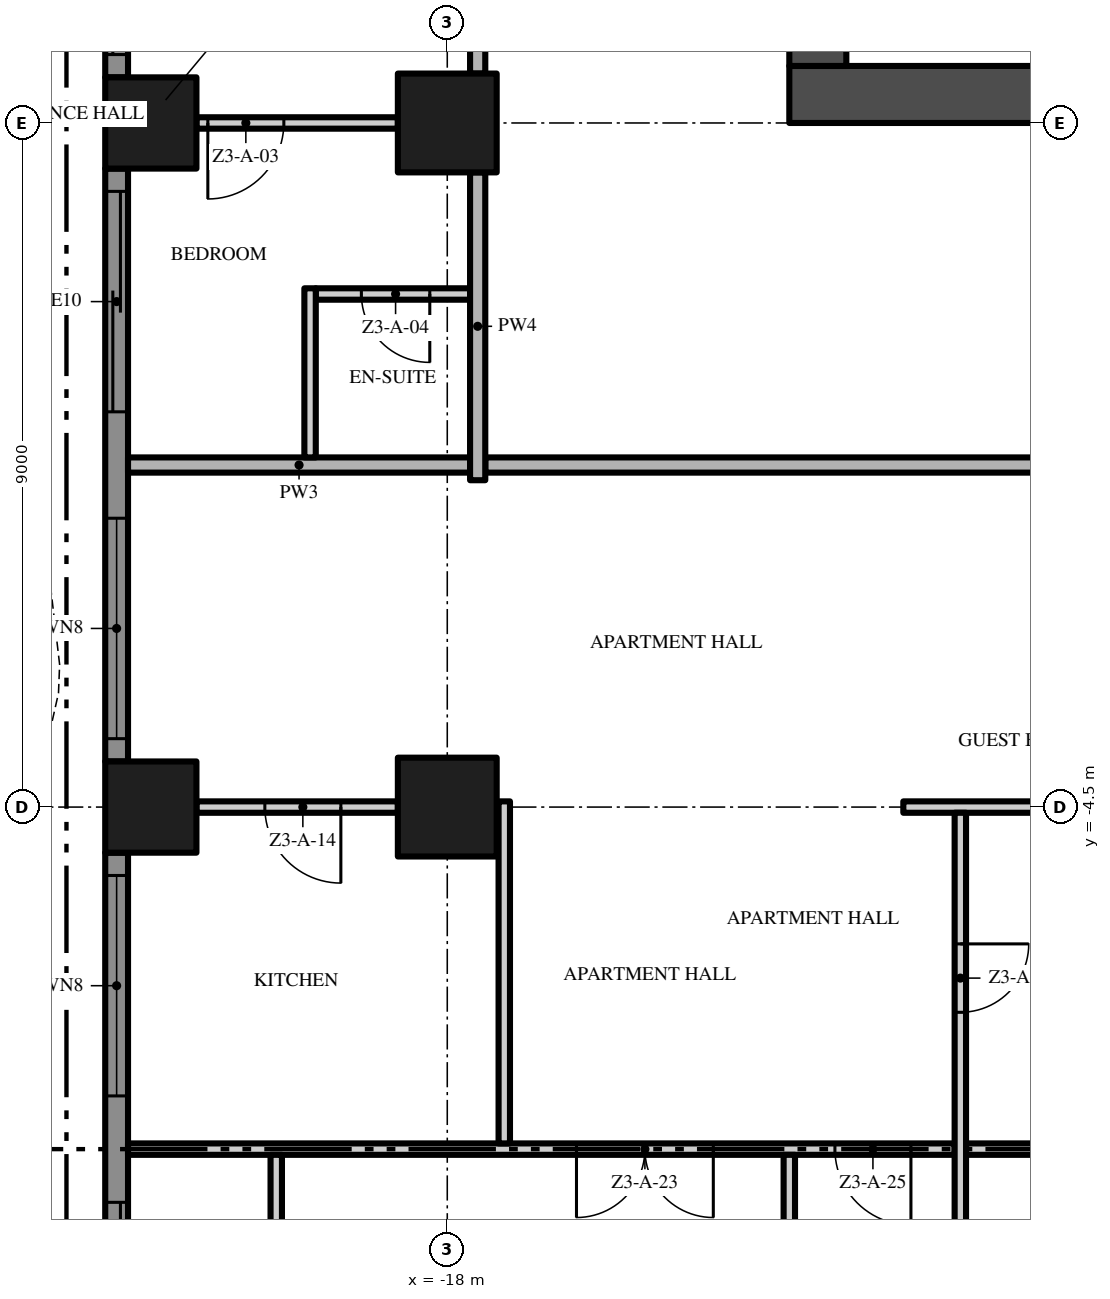
"""IFC4 building model, lengths in metres.
Left out: names, types, materials, properties, quantities, classifications, styles, units other than length and angle.
Written with IfcOpenShell. Run it as: python <this file> out.ifc"""

import sys

from ifc_helpers import new_model, si_unit, direction, frame, frame_2d, origin, origin_2d, place, context, subcontext, project, spatial, polyline, rectangle, outline, extrude, element, fill, save


model = new_model("IFC4")
c1 = context("Model", 3, precision=1e-05, world=origin(), true_north=direction((0.0, 1.0)))
c2 = subcontext(c1, "Body", "Model", "MODEL_VIEW")
j1 = project(units=[si_unit("LENGTHUNIT", "METRE"), si_unit("PLANEANGLEUNIT", "RADIAN")], contexts=[c1])
p1 = place(None, origin())
s1 = spatial("IfcSite", under=j1, at=p1, CompositionType="ELEMENT")
p2 = place(p1, origin())
s2 = spatial("IfcBuilding", under=s1, at=p2, CompositionType="ELEMENT")
p3 = place(p2, frame((0.0, 0.0, 125.0)))
s3 = spatial("IfcBuildingStorey", under=s2, at=p3, CompositionType="ELEMENT", Elevation=125.0)
p4 = place(p3, frame((-13.5, 4.875, -0.3), z_axis=(0.0, 0.0, 1.0), x_axis=(1.0, 0.0, 0.0)))
e1 = element("IfcWall", 1, at=p4, inside=s3, PredefinedType="SHEAR", context=c2, shape_type="SweptSolid", body=[
    extrude(rectangle(XDim=27.0, YDim=0.75, at=frame_2d((13.5, 0.0))), origin(), (0.0, 0.0, 1.0), 3.8),
])
p5 = place(p4, frame((12.0, 0.0, 0.3)))
e2 = element("IfcOpeningElement", 2, at=p5, cuts=e1, PredefinedType="OPENING", context=c2, shape_type="SweptSolid", body=[
    extrude(rectangle(XDim=3.0, YDim=2.4, at=frame_2d((1.5, 1.2))), frame((0.0, 0.385, 0.0), z_axis=(0.0, -1.0, 0.0), x_axis=(1.0, 0.0, 0.0)), (0.0, 0.0, 1.0), 0.77),
])
p6 = place(p4, frame((4.9, 0.0, 0.3)))
e3 = element("IfcOpeningElement", 3, at=p6, cuts=e1, PredefinedType="OPENING", context=c2, shape_type="SweptSolid", body=[
    extrude(rectangle(XDim=1.2, YDim=2.2, at=frame_2d((0.6, 1.1))), frame((0.0, 0.385, 0.0), z_axis=(0.0, -1.0, 0.0), x_axis=(1.0, 0.0, 0.0)), (0.0, 0.0, 1.0), 0.77),
])
p7 = place(p4, frame((20.75, 0.0, 0.3)))
e4 = element("IfcOpeningElement", 4, at=p7, cuts=e1, PredefinedType="OPENING", context=c2, shape_type="SweptSolid", body=[
    extrude(rectangle(XDim=1.5, YDim=2.2, at=frame_2d((0.75, 1.1))), frame((0.0, 0.385, 0.0), z_axis=(0.0, -1.0, 0.0), x_axis=(1.0, 0.0, 0.0)), (0.0, 0.0, 1.0), 0.77),
])
p8 = place(p4, frame((17.4, 0.0, 0.3)))
e5 = element("IfcOpeningElement", 5, at=p8, cuts=e1, PredefinedType="OPENING", context=c2, shape_type="SweptSolid", body=[
    extrude(rectangle(XDim=1.2, YDim=2.2, at=frame_2d((0.6, 1.1))), frame((0.0, 0.385, 0.0), z_axis=(0.0, -1.0, 0.0), x_axis=(1.0, 0.0, 0.0)), (0.0, 0.0, 1.0), 0.77),
])
p9 = place(p3, frame((-13.125, 21.75, -0.3), z_axis=(0.0, 0.0, 1.0), x_axis=(0.0, -1.0, 0.0)))
e6 = element("IfcWall", 6, at=p9, inside=s3, PredefinedType="SHEAR", context=c2, shape_type="SweptSolid", body=[
    extrude(rectangle(XDim=16.5, YDim=0.75, at=frame_2d((8.25, 0.0))), origin(), (0.0, 0.0, 1.0), 3.8),
])
p10 = place(p9, frame((9.15, 0.0, 0.3)))
e7 = element("IfcOpeningElement", 7, at=p10, cuts=e6, PredefinedType="OPENING", context=c2, shape_type="SweptSolid", body=[
    extrude(rectangle(XDim=1.2, YDim=2.2, at=frame_2d((0.6, 1.1))), frame((0.0, 0.385, 0.0), z_axis=(0.0, -1.0, 0.0), x_axis=(1.0, 0.0, 0.0)), (0.0, 0.0, 1.0), 0.77),
])
for number, where, z_axis, x_axis in (
    (8, (-18.0, -4.5, 0.0), (0.0, 0.0, 1.0), (1.0, 0.0, 0.0)),
    (9, (-18.0, 4.5, 0.0), (0.0, 0.0, 1.0), (1.0, 0.0, 0.0)),
):
    element("IfcColumn", number, at=place(p3, frame(where, z_axis=z_axis, x_axis=x_axis)), inside=s3, PredefinedType="COLUMN", context=c2, shape_type="SweptSolid", body=[
        extrude(rectangle(XDim=1.3, YDim=1.3, at=origin_2d()), origin(), (0.0, 0.0, 1.0), 3.5),
    ])
for number, where, z_axis, x_axis in (
    (10, (-21.9, -4.5, 0.0), (0.0, 0.0, 1.0), (1.0, 0.0, 0.0)),
    (11, (-21.9, 4.5, 0.0), (0.0, 0.0, 1.0), (1.0, 0.0, 0.0)),
):
    element("IfcColumn", number, at=place(p3, frame(where, z_axis=z_axis, x_axis=x_axis)), inside=s3, PredefinedType="COLUMN", context=c2, shape_type="SweptSolid", body=[
        extrude(rectangle(XDim=1.2, YDim=1.2, at=origin_2d()), origin(), (0.0, 0.0, 1.0), 3.5),
    ])
p11 = place(p3, frame((-22.35, 5.1, 0.0), z_axis=(0.0, 0.0, 1.0), x_axis=(0.0, 1.0, 0.0)))
e12 = element("IfcWall", 12, at=p11, inside=s3, PredefinedType="SOLIDWALL", context=c2, shape_type="SweptSolid", body=[
    extrude(rectangle(XDim=7.8, YDim=0.3, at=frame_2d((3.9, 0.0))), origin(), (0.0, 0.0, 1.0), 3.5),
])
p12 = place(p11, frame((4.6, 0.0, 0.45)))
e13 = element("IfcOpeningElement", 13, at=p12, cuts=e12, PredefinedType="OPENING", context=c2, shape_type="SweptSolid", body=[
    extrude(rectangle(XDim=2.9, YDim=2.65, at=frame_2d((1.45, 1.325))), frame((0.0, 0.16, 0.0), z_axis=(0.0, -1.0, 0.0), x_axis=(1.0, 0.0, 0.0)), (0.0, 0.0, 1.0), 0.32),
])
p13 = place(p11, frame((0.3, 0.0, 0.0)))
e14 = element("IfcOpeningElement", 14, at=p13, cuts=e12, PredefinedType="OPENING", context=c2, shape_type="SweptSolid", body=[
    extrude(rectangle(XDim=2.9, YDim=2.4, at=frame_2d((1.45, 1.2))), frame((0.0, 0.16, 0.0), z_axis=(0.0, -1.0, 0.0), x_axis=(1.0, 0.0, 0.0)), (0.0, 0.0, 1.0), 0.32),
])
p14 = place(p3, frame((-22.35, -3.9, 0.0), z_axis=(0.0, 0.0, 1.0), x_axis=(0.0, 1.0, 0.0)))
e15 = element("IfcWall", 15, at=p14, inside=s3, PredefinedType="SOLIDWALL", context=c2, shape_type="SweptSolid", body=[
    extrude(rectangle(XDim=7.8, YDim=0.3, at=frame_2d((3.9, 0.0))), origin(), (0.0, 0.0, 1.0), 3.5),
])
p15 = place(p14, frame((4.6, 0.0, 0.0)))
e16 = element("IfcOpeningElement", 16, at=p15, cuts=e15, PredefinedType="OPENING", context=c2, shape_type="SweptSolid", body=[
    extrude(rectangle(XDim=2.9, YDim=2.4, at=frame_2d((1.45, 1.2))), frame((0.0, 0.16, 0.0), z_axis=(0.0, -1.0, 0.0), x_axis=(1.0, 0.0, 0.0)), (0.0, 0.0, 1.0), 0.32),
])
p16 = place(p14, frame((0.3, 0.0, 0.45)))
e17 = element("IfcOpeningElement", 17, at=p16, cuts=e15, PredefinedType="OPENING", context=c2, shape_type="SweptSolid", body=[
    extrude(rectangle(XDim=2.9, YDim=2.65, at=frame_2d((1.45, 1.325))), frame((0.0, 0.16, 0.0), z_axis=(0.0, -1.0, 0.0), x_axis=(1.0, 0.0, 0.0)), (0.0, 0.0, 1.0), 0.32),
])
p17 = place(p3, frame((-22.35, -12.3, 0.0), z_axis=(0.0, 0.0, 1.0), x_axis=(0.0, 1.0, 0.0)))
e18 = element("IfcWall", 18, at=p17, inside=s3, PredefinedType="SOLIDWALL", context=c2, shape_type="SweptSolid", body=[
    extrude(rectangle(XDim=7.2, YDim=0.3, at=frame_2d((3.6, 0.0))), origin(), (0.0, 0.0, 1.0), 3.5),
])
p18 = place(p17, frame((4.0, 0.0, 0.45)))
e19 = element("IfcOpeningElement", 19, at=p18, cuts=e18, PredefinedType="OPENING", context=c2, shape_type="SweptSolid", body=[
    extrude(rectangle(XDim=2.9, YDim=2.65, at=frame_2d((1.45, 1.325))), frame((0.0, 0.16, 0.0), z_axis=(0.0, -1.0, 0.0), x_axis=(1.0, 0.0, 0.0)), (0.0, 0.0, 1.0), 0.32),
])
p19 = place(p17, frame((0.3, 0.0, 0.0)))
e20 = element("IfcOpeningElement", 20, at=p19, cuts=e18, PredefinedType="OPENING", context=c2, shape_type="SweptSolid", body=[
    extrude(rectangle(XDim=2.3, YDim=2.4, at=frame_2d((1.15, 1.2))), frame((0.0, 0.16, 0.0), z_axis=(0.0, -1.0, 0.0), x_axis=(1.0, 0.0, 0.0)), (0.0, 0.0, 1.0), 0.32),
])
p20 = place(p3, origin())
e21 = element("IfcWall", 21, at=p20, inside=s3, PredefinedType="USERDEFINED", context=c2, shape_type="SweptSolid", body=[
    extrude(outline(polyline([(-25.149, 18.0), (-24.488, 16.5), (-23.755, 15.0), (-23.231, 13.5), (-23.1, 12.375), (-23.115, 12.0), (-23.451, 10.5), (-24.112, 9.0), (-24.845, 7.5), (-25.369, 6.0), (-25.5, 4.875), (-25.485, 4.5), (-25.149, 3.0), (-24.488, 1.5), (-23.755, 0.0), (-23.231, -1.5), (-23.1, -2.625), (-23.115, -3.0), (-23.451, -4.5), (-24.112, -6.0), (-24.845, -7.5), (-25.369, -9.0), (-25.5, -10.125), (-25.485, -10.5), (-25.149, -12.0), (-24.488, -13.5), (-24.259, -13.399), (-24.91, -11.921), (-25.236, -10.467), (-25.249, -10.135), (-25.124, -9.056), (-24.614, -7.596), (-23.885, -6.105), (-23.213, -4.579), (-22.866, -3.033), (-22.849, -2.615), (-22.986, -1.444), (-23.524, 0.096), (-24.261, 1.605), (-24.91, 3.079), (-25.236, 4.533), (-25.249, 4.865), (-25.124, 5.944), (-24.614, 7.404), (-23.885, 8.895), (-23.213, 10.421), (-22.866, 11.967), (-22.849, 12.385), (-22.986, 13.556), (-23.524, 15.096), (-24.261, 16.605), (-24.92, 18.101), (-25.149, 18.0)])), origin(), (0.0, 0.0, 1.0), 0.9),
])
p21 = place(p3, frame((-11.325, -9.0, 0.0), z_axis=(0.0, 0.0, 1.0), x_axis=(-1.0, 0.0, 0.0)))
e22 = element("IfcWall", 22, at=p21, inside=s3, PredefinedType="PARTITIONING", context=c2, shape_type="SweptSolid", body=[
    extrude(rectangle(XDim=10.875, YDim=0.15, at=frame_2d((5.438, 0.0))), origin(), (0.0, 0.0, 1.0), 3.5),
])
p22 = place(p21, frame((3.175, 0.0, 0.0)))
e23 = element("IfcOpeningElement", 23, at=p22, cuts=e22, PredefinedType="OPENING", context=c2, shape_type="SweptSolid", body=[
    extrude(rectangle(XDim=1.8, YDim=2.4, at=frame_2d((0.9, 1.2))), frame((0.0, 0.085, 0.0), z_axis=(0.0, -1.0, 0.0), x_axis=(1.0, 0.0, 0.0)), (0.0, 0.0, 1.0), 0.17),
])
p23 = place(p21, frame((0.575, 0.0, 0.0)))
e24 = element("IfcOpeningElement", 24, at=p23, cuts=e22, PredefinedType="OPENING", context=c2, shape_type="SweptSolid", body=[
    extrude(rectangle(XDim=1.0, YDim=2.4, at=frame_2d((0.5, 1.2))), frame((0.0, 0.085, 0.0), z_axis=(0.0, -1.0, 0.0), x_axis=(1.0, 0.0, 0.0)), (0.0, 0.0, 1.0), 0.17),
])
p24 = place(p3, frame((-11.175, -9.0, 0.0), z_axis=(0.0, 0.0, 1.0), x_axis=(1.0, 0.0, 0.0)))
e25 = element("IfcWall", 25, at=p24, inside=s3, PredefinedType="PARTITIONING", context=c2, shape_type="SweptSolid", body=[
    extrude(rectangle(XDim=2.1, YDim=0.15, at=frame_2d((1.05, 0.0))), origin(), (0.0, 0.0, 1.0), 3.5),
])
p25 = place(p3, frame((-18.65, -4.5, 0.0), z_axis=(0.0, 0.0, 1.0), x_axis=(-1.0, 0.0, 0.0)))
e26 = element("IfcWall", 26, at=p25, inside=s3, PredefinedType="PARTITIONING", context=c2, shape_type="SweptSolid", body=[
    extrude(rectangle(XDim=2.65, YDim=0.15, at=frame_2d((1.325, 0.0))), origin(), (0.0, 0.0, 1.0), 3.5),
])
p26 = place(p25, frame((0.75, 0.0, 0.0)))
e27 = element("IfcOpeningElement", 27, at=p26, cuts=e26, PredefinedType="OPENING", context=c2, shape_type="SweptSolid", body=[
    extrude(rectangle(XDim=1.0, YDim=2.4, at=frame_2d((0.5, 1.2))), frame((0.0, 0.085, 0.0), z_axis=(0.0, -1.0, 0.0), x_axis=(1.0, 0.0, 0.0)), (0.0, 0.0, 1.0), 0.17),
])
p27 = place(p3, frame((-12.0, -4.5, 0.0), z_axis=(0.0, 0.0, 1.0), x_axis=(1.0, 0.0, 0.0)))
e28 = element("IfcWall", 28, at=p27, inside=s3, PredefinedType="PARTITIONING", context=c2, shape_type="SweptSolid", body=[
    extrude(rectangle(XDim=2.35, YDim=0.15, at=frame_2d((1.175, 0.0))), origin(), (0.0, 0.0, 1.0), 3.5),
])
p28 = place(p3, frame((17.5, 0.0, 0.0), z_axis=(0.0, 0.0, 1.0), x_axis=(-1.0, 0.0, 0.0)))
e29 = element("IfcWall", 29, at=p28, inside=s3, PredefinedType="PARTITIONING", context=c2, shape_type="SweptSolid", body=[
    extrude(rectangle(XDim=35.0, YDim=0.2, at=frame_2d((17.5, 0.0))), origin(), (0.0, 0.0, 1.0), 3.5),
])
p29 = place(p28, frame((16.75, 0.0, 0.0)))
e30 = element("IfcOpeningElement", 30, at=p29, cuts=e29, PredefinedType="OPENING", context=c2, shape_type="SweptSolid", body=[
    extrude(rectangle(XDim=1.5, YDim=2.4, at=frame_2d((0.75, 1.2))), frame((0.0, 0.11, 0.0), z_axis=(0.0, -1.0, 0.0), x_axis=(1.0, 0.0, 0.0)), (0.0, 0.0, 1.0), 0.22),
])
p30 = place(p3, frame((-22.2, 0.0, 0.0), z_axis=(0.0, 0.0, 1.0), x_axis=(1.0, 0.0, 0.0)))
e31 = element("IfcWall", 31, at=p30, inside=s3, PredefinedType="PARTITIONING", context=c2, shape_type="SweptSolid", body=[
    extrude(rectangle(XDim=4.5, YDim=0.2, at=frame_2d((2.25, 0.0))), origin(), (0.0, 0.0, 1.0), 3.5),
])
p31 = place(p3, frame((-17.7, 2.25, 0.0), z_axis=(0.0, 0.0, 1.0), x_axis=(-1.0, 0.0, 0.0)))
e32 = element("IfcWall", 32, at=p31, inside=s3, PredefinedType="PARTITIONING", context=c2, shape_type="SweptSolid", body=[
    extrude(rectangle(XDim=2.03, YDim=0.15, at=frame_2d((1.015, 0.0))), origin(), (0.0, 0.0, 1.0), 3.5),
])
p32 = place(p31, frame((0.53, 0.0, 0.0)))
e33 = element("IfcOpeningElement", 33, at=p32, cuts=e32, PredefinedType="OPENING", context=c2, shape_type="SweptSolid", body=[
    extrude(rectangle(XDim=0.9, YDim=2.1, at=frame_2d((0.45, 1.05))), frame((0.0, 0.085, 0.0), z_axis=(0.0, -1.0, 0.0), x_axis=(1.0, 0.0, 0.0)), (0.0, 0.0, 1.0), 0.17),
])
p33 = place(p3, frame((-18.65, 4.5, 0.0), z_axis=(0.0, 0.0, 1.0), x_axis=(-1.0, 0.0, 0.0)))
e34 = element("IfcWall", 34, at=p33, inside=s3, PredefinedType="PARTITIONING", context=c2, shape_type="SweptSolid", body=[
    extrude(rectangle(XDim=2.65, YDim=0.15, at=frame_2d((1.325, 0.0))), origin(), (0.0, 0.0, 1.0), 3.5),
])
p34 = place(p33, frame((1.5, 0.0, 0.0)))
e35 = element("IfcOpeningElement", 35, at=p34, cuts=e34, PredefinedType="OPENING", context=c2, shape_type="SweptSolid", body=[
    extrude(rectangle(XDim=1.0, YDim=2.4, at=frame_2d((0.5, 1.2))), frame((0.0, 0.085, 0.0), z_axis=(0.0, -1.0, 0.0), x_axis=(1.0, 0.0, 0.0)), (0.0, 0.0, 1.0), 0.17),
])
p35 = place(p3, frame((-20.25, -12.075, 0.0), z_axis=(0.0, 0.0, 1.0), x_axis=(0.0, 1.0, 0.0)))
e36 = element("IfcWall", 36, at=p35, inside=s3, PredefinedType="PARTITIONING", context=c2, shape_type="SweptSolid", body=[
    extrude(rectangle(XDim=3.0, YDim=0.15, at=frame_2d((1.5, 0.0))), origin(), (0.0, 0.0, 1.0), 3.5),
])
p36 = place(p35, frame((1.125, 0.0, 0.0)))
e37 = element("IfcOpeningElement", 37, at=p36, cuts=e36, PredefinedType="OPENING", context=c2, shape_type="SweptSolid", body=[
    extrude(rectangle(XDim=0.9, YDim=2.1, at=frame_2d((0.45, 1.05))), frame((0.0, 0.085, 0.0), z_axis=(0.0, -1.0, 0.0), x_axis=(1.0, 0.0, 0.0)), (0.0, 0.0, 1.0), 0.17),
])
p37 = place(p3, frame((-19.805, 0.1, 0.0), z_axis=(0.0, 0.0, 1.0), x_axis=(0.0, 1.0, 0.0)))
e38 = element("IfcWall", 38, at=p37, inside=s3, PredefinedType="PARTITIONING", context=c2, shape_type="SweptSolid", body=[
    extrude(rectangle(XDim=2.225, YDim=0.15, at=frame_2d((1.113, 0.0))), origin(), (0.0, 0.0, 1.0), 3.5),
])
p38 = place(p3, frame((-17.6, -0.2, 0.0), z_axis=(0.0, 0.0, 1.0), x_axis=(0.0, 1.0, 0.0)))
e39 = element("IfcWall", 39, at=p38, inside=s3, PredefinedType="PARTITIONING", context=c2, shape_type="SweptSolid", body=[
    extrude(rectangle(XDim=4.05, YDim=0.2, at=frame_2d((2.025, 0.0))), origin(), (0.0, 0.0, 1.0), 3.5),
])
p39 = place(p3, frame((-17.6, 5.15, 0.0), z_axis=(0.0, 0.0, 1.0), x_axis=(0.0, 1.0, 0.0)))
e40 = element("IfcWall", 40, at=p39, inside=s3, PredefinedType="PARTITIONING", context=c2, shape_type="SweptSolid", body=[
    extrude(rectangle(XDim=7.7, YDim=0.2, at=frame_2d((3.85, 0.0))), origin(), (0.0, 0.0, 1.0), 3.5),
])
p40 = place(p39, frame((1.0, 0.0, 0.0)))
e41 = element("IfcOpeningElement", 41, at=p40, cuts=e40, PredefinedType="OPENING", context=c2, shape_type="SweptSolid", body=[
    extrude(rectangle(XDim=1.2, YDim=2.4, at=frame_2d((0.6, 1.2))), frame((0.0, 0.11, 0.0), z_axis=(0.0, -1.0, 0.0), x_axis=(1.0, 0.0, 0.0)), (0.0, 0.0, 1.0), 0.22),
])
p41 = place(p3, frame((-17.25, -8.925, 0.0), z_axis=(0.0, 0.0, 1.0), x_axis=(0.0, 1.0, 0.0)))
e42 = element("IfcWall", 42, at=p41, inside=s3, PredefinedType="PARTITIONING", context=c2, shape_type="SweptSolid", body=[
    extrude(rectangle(XDim=4.5, YDim=0.15, at=frame_2d((2.25, 0.0))), origin(), (0.0, 0.0, 1.0), 3.5),
])
p42 = place(p3, frame((-13.5, -17.7, 0.0), z_axis=(0.0, 0.0, 1.0), x_axis=(0.0, 1.0, 0.0)))
e43 = element("IfcWall", 43, at=p42, inside=s3, PredefinedType="PARTITIONING", context=c2, shape_type="SweptSolid", body=[
    extrude(rectangle(XDim=8.625, YDim=0.15, at=frame_2d((4.312, 0.0))), origin(), (0.0, 0.0, 1.0), 3.5),
])
p43 = place(p3, frame((-11.25, -4.575, 0.0), z_axis=(0.0, 0.0, 1.0), x_axis=(0.0, -1.0, 0.0)))
e44 = element("IfcWall", 44, at=p43, inside=s3, PredefinedType="PARTITIONING", context=c2, shape_type="SweptSolid", body=[
    extrude(rectangle(XDim=7.5, YDim=0.15, at=frame_2d((3.75, 0.0))), origin(), (0.0, 0.0, 1.0), 3.5),
])
p44 = place(p43, frame((1.725, 0.0, 0.0)))
e45 = element("IfcOpeningElement", 45, at=p44, cuts=e44, PredefinedType="OPENING", context=c2, shape_type="SweptSolid", body=[
    extrude(rectangle(XDim=0.9, YDim=2.1, at=frame_2d((0.45, 1.05))), frame((0.0, 0.085, 0.0), z_axis=(0.0, -1.0, 0.0), x_axis=(1.0, 0.0, 0.0)), (0.0, 0.0, 1.0), 0.17),
])
p45 = place(p13, origin())
e46 = element("IfcDoor", 46, at=p45, inside=s3, OperationType="SINGLE_SWING_LEFT", PredefinedType="DOOR", context=c2, shape_type="SweptSolid", body=[
    extrude(rectangle(XDim=2.9, YDim=2.4, at=frame_2d((1.45, 1.2))), frame((0.0, 0.025, 0.0), z_axis=(0.0, -1.0, 0.0), x_axis=(1.0, 0.0, 0.0)), (0.0, 0.0, 1.0), 0.05),
])
fill(e14, e46)
p46 = place(p15, origin())
e47 = element("IfcDoor", 47, at=p46, inside=s3, OperationType="SINGLE_SWING_LEFT", PredefinedType="DOOR", context=c2, shape_type="SweptSolid", body=[
    extrude(rectangle(XDim=2.9, YDim=2.4, at=frame_2d((1.45, 1.2))), frame((0.0, 0.025, 0.0), z_axis=(0.0, -1.0, 0.0), x_axis=(1.0, 0.0, 0.0)), (0.0, 0.0, 1.0), 0.05),
])
fill(e16, e47)
p47 = place(p16, origin())
e48 = element("IfcWindow", 48, at=p47, inside=s3, PartitioningType="SINGLE_PANEL", PredefinedType="WINDOW", context=c2, shape_type="SweptSolid", body=[
    extrude(rectangle(XDim=2.9, YDim=2.65, at=frame_2d((1.45, 1.325))), frame((0.0, 0.03, 0.0), z_axis=(0.0, -1.0, 0.0), x_axis=(1.0, 0.0, 0.0)), (0.0, 0.0, 1.0), 0.06),
])
fill(e17, e48)
p48 = place(p18, origin())
e49 = element("IfcWindow", 49, at=p48, inside=s3, PartitioningType="SINGLE_PANEL", PredefinedType="WINDOW", context=c2, shape_type="SweptSolid", body=[
    extrude(rectangle(XDim=2.9, YDim=2.65, at=frame_2d((1.45, 1.325))), frame((0.0, 0.03, 0.0), z_axis=(0.0, -1.0, 0.0), x_axis=(1.0, 0.0, 0.0)), (0.0, 0.0, 1.0), 0.06),
])
fill(e19, e49)
p49 = place(p19, origin())
e50 = element("IfcDoor", 50, at=p49, inside=s3, OperationType="SINGLE_SWING_LEFT", PredefinedType="DOOR", context=c2, shape_type="SweptSolid", body=[
    extrude(rectangle(XDim=2.3, YDim=2.4, at=frame_2d((1.15, 1.2))), frame((0.0, 0.025, 0.0), z_axis=(0.0, -1.0, 0.0), x_axis=(1.0, 0.0, 0.0)), (0.0, 0.0, 1.0), 0.05),
])
fill(e20, e50)
p50 = place(p34, origin())
e51 = element("IfcDoor", 51, at=p50, inside=s3, OperationType="SINGLE_SWING_RIGHT", PredefinedType="DOOR", context=c2, shape_type="SweptSolid", body=[
    extrude(rectangle(XDim=1.0, YDim=2.4, at=frame_2d((0.5, 1.2))), frame((0.0, 0.025, 0.0), z_axis=(0.0, -1.0, 0.0), x_axis=(1.0, 0.0, 0.0)), (0.0, 0.0, 1.0), 0.05),
])
fill(e35, e51)
p51 = place(p32, origin())
e52 = element("IfcDoor", 52, at=p51, inside=s3, OperationType="SINGLE_SWING_LEFT", PredefinedType="DOOR", context=c2, shape_type="SweptSolid", body=[
    extrude(rectangle(XDim=0.9, YDim=2.1, at=frame_2d((0.45, 1.05))), frame((0.0, 0.025, 0.0), z_axis=(0.0, -1.0, 0.0), x_axis=(1.0, 0.0, 0.0)), (0.0, 0.0, 1.0), 0.05),
])
fill(e33, e52)
p52 = place(p26, origin())
e53 = element("IfcDoor", 53, at=p52, inside=s3, OperationType="SINGLE_SWING_LEFT", PredefinedType="DOOR", context=c2, shape_type="SweptSolid", body=[
    extrude(rectangle(XDim=1.0, YDim=2.4, at=frame_2d((0.5, 1.2))), frame((0.0, 0.025, 0.0), z_axis=(0.0, -1.0, 0.0), x_axis=(1.0, 0.0, 0.0)), (0.0, 0.0, 1.0), 0.05),
])
fill(e27, e53)
p53 = place(p44, origin())
e54 = element("IfcDoor", 54, at=p53, inside=s3, OperationType="SINGLE_SWING_LEFT", PredefinedType="DOOR", context=c2, shape_type="SweptSolid", body=[
    extrude(rectangle(XDim=0.9, YDim=2.1, at=frame_2d((0.45, 1.05))), frame((0.0, 0.025, 0.0), z_axis=(0.0, -1.0, 0.0), x_axis=(1.0, 0.0, 0.0)), (0.0, 0.0, 1.0), 0.05),
])
fill(e45, e54)
p54 = place(p22, origin())
e55 = element("IfcDoor", 55, at=p54, inside=s3, OperationType="DOUBLE_DOOR_SINGLE_SWING", PredefinedType="DOOR", context=c2, shape_type="SweptSolid", body=[
    extrude(rectangle(XDim=1.8, YDim=2.4, at=frame_2d((0.9, 1.2))), frame((0.0, 0.025, 0.0), z_axis=(0.0, -1.0, 0.0), x_axis=(1.0, 0.0, 0.0)), (0.0, 0.0, 1.0), 0.05),
])
fill(e23, e55)
p55 = place(p23, origin())
e56 = element("IfcDoor", 56, at=p55, inside=s3, OperationType="SINGLE_SWING_LEFT", PredefinedType="DOOR", context=c2, shape_type="SweptSolid", body=[
    extrude(rectangle(XDim=1.0, YDim=2.4, at=frame_2d((0.5, 1.2))), frame((0.0, 0.025, 0.0), z_axis=(0.0, -1.0, 0.0), x_axis=(1.0, 0.0, 0.0)), (0.0, 0.0, 1.0), 0.05),
])
fill(e24, e56)
save(model, sys.argv[1])
